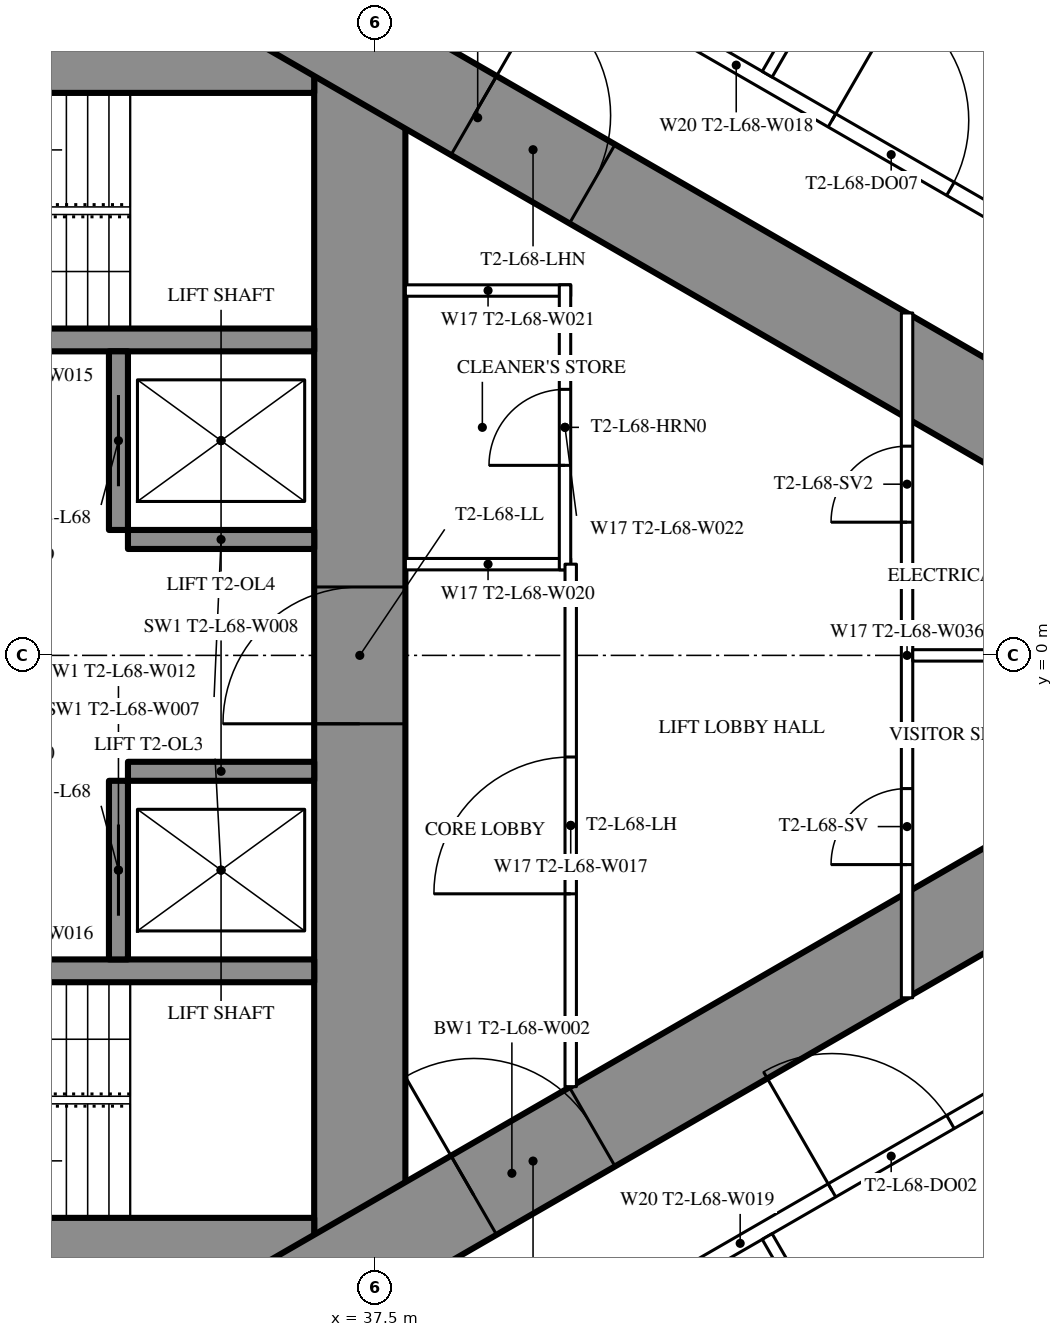
"""IFC4 building model, lengths in metres.
Left out: names, types, materials, properties, quantities, classifications, styles, units other than length and angle.
Written with IfcOpenShell. Run it as: python <this file> out.ifc"""

import sys

from ifc_helpers import new_model, si_unit, direction, frame, frame_2d, origin, place, context, subcontext, project, spatial, rectangle, extrude, element, fill, save


model = new_model("IFC4")
c1 = context("Model", 3, precision=1e-05, world=origin(), true_north=direction((0.0, 1.0)))
c2 = subcontext(c1, "Body", "Model", "MODEL_VIEW")
j1 = project(units=[si_unit("LENGTHUNIT", "METRE"), si_unit("PLANEANGLEUNIT", "RADIAN")], contexts=[c1])
p1 = place(None, origin())
s1 = spatial("IfcSite", under=j1, at=p1, CompositionType="ELEMENT")
p2 = place(p1, origin())
s2 = spatial("IfcBuilding", under=s1, at=p2, CompositionType="ELEMENT")
p3 = place(p2, frame((0.0, 0.0, 257.3)))
s3 = spatial("IfcBuildingStorey", under=s2, at=p3, CompositionType="ELEMENT", Elevation=257.3)
p4 = place(p3, frame((37.3, -8.6, 0.0), z_axis=(0.0, 0.0, 1.0), x_axis=(0.0, 1.0, 0.0)))
e1 = element("IfcWall", 1, at=p4, inside=s3, PredefinedType="SHEAR", context=c2, shape_type="SweptSolid", body=[
    extrude(rectangle(XDim=17.2, YDim=1.2, at=frame_2d((8.6, 0.0))), origin(), (0.0, 0.0, 1.0), 6.0),
])
p5 = place(p4, frame((7.7, 0.0, 0.0)))
e2 = element("IfcOpeningElement", 2, at=p5, cuts=e1, PredefinedType="OPENING", context=c2, shape_type="SweptSolid", body=[
    extrude(rectangle(XDim=1.8, YDim=2.2, at=frame_2d((0.9, 1.1))), frame((0.0, 0.61, 0.0), z_axis=(0.0, -1.0, 0.0), x_axis=(1.0, 0.0, 0.0)), (0.0, 0.0, 1.0), 1.22),
])
p6 = place(p3, frame((28.3, -8.0, 0.0), z_axis=(0.0, 0.0, 1.0), x_axis=(1.0, 0.0, 0.0)))
e3 = element("IfcWall", 3, at=p6, inside=s3, PredefinedType="SHEAR", context=c2, shape_type="SweptSolid", body=[
    extrude(rectangle(XDim=8.4, YDim=1.2, at=frame_2d((4.2, 0.0))), origin(), (0.0, 0.0, 1.0), 6.0),
])
p7 = place(p6, frame((0.25, 0.0, 0.0)))
e4 = element("IfcOpeningElement", 4, at=p7, cuts=e3, PredefinedType="OPENING", context=c2, shape_type="SweptSolid", body=[
    extrude(rectangle(XDim=1.0, YDim=2.2, at=frame_2d((0.5, 1.1))), frame((0.0, 0.61, 0.0), z_axis=(0.0, -1.0, 0.0), x_axis=(1.0, 0.0, 0.0)), (0.0, 0.0, 1.0), 1.22),
])
p8 = place(p3, frame((28.3, 8.0, 0.0), z_axis=(0.0, 0.0, 1.0), x_axis=(1.0, 0.0, 0.0)))
e5 = element("IfcWall", 5, at=p8, inside=s3, PredefinedType="SHEAR", context=c2, shape_type="SweptSolid", body=[
    extrude(rectangle(XDim=8.4, YDim=1.2, at=frame_2d((4.2, 0.0))), origin(), (0.0, 0.0, 1.0), 6.0),
])
p9 = place(p8, frame((0.25, 0.0, 0.0)))
e6 = element("IfcOpeningElement", 6, at=p9, cuts=e5, PredefinedType="OPENING", context=c2, shape_type="SweptSolid", body=[
    extrude(rectangle(XDim=1.0, YDim=2.2, at=frame_2d((0.5, 1.1))), frame((0.0, 0.61, 0.0), z_axis=(0.0, -1.0, 0.0), x_axis=(1.0, 0.0, 0.0)), (0.0, 0.0, 1.0), 1.22),
])
for number, where, z_axis, x_axis in (
    (7, (28.3, -4.15, 0.0), (0.0, 0.0, 1.0), (1.0, 0.0, 0.0)),
    (8, (28.3, 4.15, 0.0), (0.0, 0.0, 1.0), (1.0, 0.0, 0.0)),
):
    element("IfcWall", number, at=place(p3, frame(where, z_axis=z_axis, x_axis=x_axis)), inside=s3, PredefinedType="SHEAR", context=c2, shape_type="SweptSolid", body=[
        extrude(rectangle(XDim=8.4, YDim=0.3, at=frame_2d((4.2, 0.0))), origin(), (0.0, 0.0, 1.0), 6.0),
    ])
p10 = place(p3, frame((34.125, -4.0, 0.0), z_axis=(0.0, 0.0, 1.0), x_axis=(0.0, 1.0, 0.0)))
e9 = element("IfcWall", 9, at=p10, inside=s3, PredefinedType="SHEAR", context=c2, shape_type="SweptSolid", body=[
    extrude(rectangle(XDim=2.35, YDim=0.25, at=frame_2d((1.175, 0.0))), origin(), (0.0, 0.0, 1.0), 6.0),
])
p11 = place(p10, frame((0.575, 0.0, 0.0)))
e10 = element("IfcOpeningElement", 10, at=p11, cuts=e9, PredefinedType="OPENING", context=c2, shape_type="SweptSolid", body=[
    extrude(rectangle(XDim=1.2, YDim=2.2, at=frame_2d((0.6, 1.1))), frame((0.0, 0.135, 0.0), z_axis=(0.0, -1.0, 0.0), x_axis=(1.0, 0.0, 0.0)), (0.0, 0.0, 1.0), 0.27),
])
p12 = place(p3, frame((34.25, -1.525, 0.0), z_axis=(0.0, 0.0, 1.0), x_axis=(1.0, 0.0, 0.0)))
e11 = element("IfcWall", 11, at=p12, inside=s3, PredefinedType="SHEAR", context=c2, shape_type="SweptSolid", body=[
    extrude(rectangle(XDim=2.45, YDim=0.25, at=frame_2d((1.225, 0.0))), origin(), (0.0, 0.0, 1.0), 6.0),
])
p13 = place(p3, frame((34.125, 1.65, 0.0), z_axis=(0.0, 0.0, 1.0), x_axis=(0.0, 1.0, 0.0)))
e12 = element("IfcWall", 12, at=p13, inside=s3, PredefinedType="SHEAR", context=c2, shape_type="SweptSolid", body=[
    extrude(rectangle(XDim=2.35, YDim=0.25, at=frame_2d((1.175, 0.0))), origin(), (0.0, 0.0, 1.0), 6.0),
])
p14 = place(p13, frame((0.575, 0.0, 0.0)))
e13 = element("IfcOpeningElement", 13, at=p14, cuts=e12, PredefinedType="OPENING", context=c2, shape_type="SweptSolid", body=[
    extrude(rectangle(XDim=1.2, YDim=2.2, at=frame_2d((0.6, 1.1))), frame((0.0, 0.135, 0.0), z_axis=(0.0, -1.0, 0.0), x_axis=(1.0, 0.0, 0.0)), (0.0, 0.0, 1.0), 0.27),
])
p15 = place(p3, frame((34.25, 1.525, 0.0), z_axis=(0.0, 0.0, 1.0), x_axis=(1.0, 0.0, 0.0)))
e14 = element("IfcWall", 14, at=p15, inside=s3, PredefinedType="SHEAR", context=c2, shape_type="SweptSolid", body=[
    extrude(rectangle(XDim=2.45, YDim=0.25, at=frame_2d((1.225, 0.0))), origin(), (0.0, 0.0, 1.0), 6.0),
])
p16 = place(p3, frame((27.2, -13.8, 0.0), z_axis=(0.0, 0.0, 1.0), x_axis=(0.866027159892, 0.499996958321, 0.0)))
e15 = element("IfcWall", 15, at=p16, inside=s3, PredefinedType="SHEAR", context=c2, shape_type="SweptSolid", body=[
    extrude(rectangle(XDim=27.947, YDim=1.2, at=frame_2d((13.973, 0.0))), origin(), (0.0, 0.0, 1.0), 6.0),
])
p17 = place(p16, frame((4.6, 0.0, 0.0)))
e16 = element("IfcOpeningElement", 16, at=p17, cuts=e15, PredefinedType="OPENING", context=c2, shape_type="SweptSolid", body=[
    extrude(rectangle(XDim=1.0, YDim=2.2, at=frame_2d((0.5, 1.1))), frame((0.0, 0.61, 0.0), z_axis=(0.0, -1.0, 0.0), x_axis=(1.0, 0.0, 0.0)), (0.0, 0.0, 1.0), 1.22),
])
p18 = place(p16, frame((13.395, 0.0, 0.0)))
e17 = element("IfcOpeningElement", 17, at=p18, cuts=e15, PredefinedType="OPENING", context=c2, shape_type="SweptSolid", body=[
    extrude(rectangle(XDim=1.8, YDim=2.2, at=frame_2d((0.9, 1.1))), frame((0.0, 0.61, 0.0), z_axis=(0.0, -1.0, 0.0), x_axis=(1.0, 0.0, 0.0)), (0.0, 0.0, 1.0), 1.22),
])
p19 = place(p3, frame((27.2, 13.8, 0.0), z_axis=(0.0, 0.0, 1.0), x_axis=(0.866024515034, -0.500001539357, 0.0)))
e18 = element("IfcWall", 18, at=p19, inside=s3, PredefinedType="SHEAR", context=c2, shape_type="SweptSolid", body=[
    extrude(rectangle(XDim=26.907, YDim=1.2, at=frame_2d((13.454, 0.0))), origin(), (0.0, 0.0, 1.0), 6.0),
])
p20 = place(p19, frame((4.6, 0.0, 0.0)))
e19 = element("IfcOpeningElement", 19, at=p20, cuts=e18, PredefinedType="OPENING", context=c2, shape_type="SweptSolid", body=[
    extrude(rectangle(XDim=1.0, YDim=2.2, at=frame_2d((0.5, 1.1))), frame((0.0, 0.61, 0.0), z_axis=(0.0, -1.0, 0.0), x_axis=(1.0, 0.0, 0.0)), (0.0, 0.0, 1.0), 1.22),
])
p21 = place(p19, frame((13.395, 0.0, 0.0)))
e20 = element("IfcOpeningElement", 20, at=p21, cuts=e18, PredefinedType="OPENING", context=c2, shape_type="SweptSolid", body=[
    extrude(rectangle(XDim=1.8, YDim=2.2, at=frame_2d((0.9, 1.1))), frame((0.0, 0.61, 0.0), z_axis=(0.0, -1.0, 0.0), x_axis=(1.0, 0.0, 0.0)), (0.0, 0.0, 1.0), 1.22),
])
p22 = place(p3, frame((28.907, -15.47, 0.0), z_axis=(0.0, 0.0, 1.0), x_axis=(0.866023700353, 0.500002950419, 0.0)))
e21 = element("IfcWall", 21, at=p22, inside=s3, PredefinedType="PARTITIONING", context=c2, shape_type="SweptSolid", body=[
    extrude(rectangle(XDim=30.941, YDim=0.2, at=frame_2d((15.47, 0.0))), origin(), (0.0, 0.0, 1.0), 5.75),
])
p23 = place(p22, frame((7.024, 0.0, 0.0)))
e22 = element("IfcOpeningElement", 22, at=p23, cuts=e21, PredefinedType="OPENING", context=c2, shape_type="SweptSolid", body=[
    extrude(rectangle(XDim=2.0, YDim=2.4, at=frame_2d((1.0, 1.2))), frame((0.0, 0.11, 0.0), z_axis=(0.0, -1.0, 0.0), x_axis=(1.0, 0.0, 0.0)), (0.0, 0.0, 1.0), 0.22),
])
p24 = place(p22, frame((16.865, 0.0, 0.0)))
e23 = element("IfcOpeningElement", 23, at=p24, cuts=e21, PredefinedType="OPENING", context=c2, shape_type="SweptSolid", body=[
    extrude(rectangle(XDim=1.8, YDim=2.2, at=frame_2d((0.9, 1.1))), frame((0.0, 0.11, 0.0), z_axis=(0.0, -1.0, 0.0), x_axis=(1.0, 0.0, 0.0)), (0.0, 0.0, 1.0), 0.22),
])
p25 = place(p22, frame((20.748, 0.0, 0.0)))
e24 = element("IfcOpeningElement", 24, at=p25, cuts=e21, PredefinedType="OPENING", context=c2, shape_type="SweptSolid", body=[
    extrude(rectangle(XDim=1.8, YDim=2.2, at=frame_2d((0.9, 1.1))), frame((0.0, 0.11, 0.0), z_axis=(0.0, -1.0, 0.0), x_axis=(1.0, 0.0, 0.0)), (0.0, 0.0, 1.0), 0.22),
])
p26 = place(p22, frame((26.152, 0.0, 0.0)))
e25 = element("IfcOpeningElement", 25, at=p26, cuts=e21, PredefinedType="OPENING", context=c2, shape_type="SweptSolid", body=[
    extrude(rectangle(XDim=2.0, YDim=2.4, at=frame_2d((1.0, 1.2))), frame((0.0, 0.11, 0.0), z_axis=(0.0, -1.0, 0.0), x_axis=(1.0, 0.0, 0.0)), (0.0, 0.0, 1.0), 0.22),
])
p27 = place(p3, frame((28.907, 15.47, 0.0), z_axis=(0.0, 0.0, 1.0), x_axis=(0.866025841386, -0.499999242051, 0.0)))
e26 = element("IfcWall", 26, at=p27, inside=s3, PredefinedType="PARTITIONING", context=c2, shape_type="SweptSolid", body=[
    extrude(rectangle(XDim=30.821, YDim=0.2, at=frame_2d((15.41, 0.0))), origin(), (0.0, 0.0, 1.0), 5.75),
])
p28 = place(p27, frame((26.092, 0.0, 0.0)))
e27 = element("IfcOpeningElement", 27, at=p28, cuts=e26, PredefinedType="OPENING", context=c2, shape_type="SweptSolid", body=[
    extrude(rectangle(XDim=2.0, YDim=2.4, at=frame_2d((1.0, 1.2))), frame((0.0, 0.11, 0.0), z_axis=(0.0, -1.0, 0.0), x_axis=(1.0, 0.0, 0.0)), (0.0, 0.0, 1.0), 0.22),
])
p29 = place(p27, frame((20.748, 0.0, 0.0)))
e28 = element("IfcOpeningElement", 28, at=p29, cuts=e26, PredefinedType="OPENING", context=c2, shape_type="SweptSolid", body=[
    extrude(rectangle(XDim=1.8, YDim=2.2, at=frame_2d((0.9, 1.1))), frame((0.0, 0.11, 0.0), z_axis=(0.0, -1.0, 0.0), x_axis=(1.0, 0.0, 0.0)), (0.0, 0.0, 1.0), 0.22),
])
p30 = place(p27, frame((16.865, 0.0, 0.0)))
e29 = element("IfcOpeningElement", 29, at=p30, cuts=e26, PredefinedType="OPENING", context=c2, shape_type="SweptSolid", body=[
    extrude(rectangle(XDim=1.8, YDim=2.2, at=frame_2d((0.9, 1.1))), frame((0.0, 0.11, 0.0), z_axis=(0.0, -1.0, 0.0), x_axis=(1.0, 0.0, 0.0)), (0.0, 0.0, 1.0), 0.22),
])
p31 = place(p27, frame((7.024, 0.0, 0.0)))
e30 = element("IfcOpeningElement", 30, at=p31, cuts=e26, PredefinedType="OPENING", context=c2, shape_type="SweptSolid", body=[
    extrude(rectangle(XDim=2.0, YDim=2.4, at=frame_2d((1.0, 1.2))), frame((0.0, 0.11, 0.0), z_axis=(0.0, -1.0, 0.0), x_axis=(1.0, 0.0, 0.0)), (0.0, 0.0, 1.0), 0.22),
])
for number, where, z_axis, x_axis in (
    (31, (42.66, -7.646, 0.0), (0.0, 0.0, 1.0), (0.5, -0.866, 0.0)),
    (32, (42.66, 7.646, 0.0), (0.0, 0.0, 1.0), (0.5, 0.866, 0.0)),
):
    element("IfcWall", number, at=place(p3, frame(where, z_axis=z_axis, x_axis=x_axis)), inside=s3, PredefinedType="PARTITIONING", context=c2, shape_type="SweptSolid", body=[
        extrude(rectangle(XDim=6.398, YDim=0.15, at=frame_2d((3.199, 0.0))), origin(), (0.0, 0.0, 1.0), 4.85),
    ])
for number, where, z_axis, x_axis in (
    (33, (37.9, 1.2, 0.0), (0.0, 0.0, 1.0), (1.0, 0.0, 0.0)),
    (34, (37.9, 4.8, 0.0), (0.0, 0.0, 1.0), (1.0, 0.0, 0.0)),
):
    element("IfcWall", number, at=place(p3, frame(where, z_axis=z_axis, x_axis=x_axis)), inside=s3, PredefinedType="PARTITIONING", context=c2, shape_type="SweptSolid", body=[
        extrude(rectangle(XDim=2.175, YDim=0.15, at=frame_2d((1.087, 0.0))), origin(), (0.0, 0.0, 1.0), 5.75),
    ])
p32 = place(p3, frame((40.0, 1.125, 0.0), z_axis=(0.0, 0.0, 1.0), x_axis=(0.0, 1.0, 0.0)))
e35 = element("IfcWall", 35, at=p32, inside=s3, PredefinedType="PARTITIONING", context=c2, shape_type="SweptSolid", body=[
    extrude(rectangle(XDim=3.75, YDim=0.15, at=frame_2d((1.875, 0.0))), origin(), (0.0, 0.0, 1.0), 5.75),
])
p33 = place(p32, frame((1.375, 0.0, 0.0)))
e36 = element("IfcOpeningElement", 36, at=p33, cuts=e35, PredefinedType="OPENING", context=c2, shape_type="SweptSolid", body=[
    extrude(rectangle(XDim=1.0, YDim=2.2, at=frame_2d((0.5, 1.1))), frame((0.0, 0.085, 0.0), z_axis=(0.0, -1.0, 0.0), x_axis=(1.0, 0.0, 0.0)), (0.0, 0.0, 1.0), 0.17),
])
p34 = place(p3, frame((40.075, -5.674, 0.0), z_axis=(0.0, 0.0, 1.0), x_axis=(0.0, 1.0, 0.0)))
e37 = element("IfcWall", 37, at=p34, inside=s3, PredefinedType="PARTITIONING", context=c2, shape_type="SweptSolid", body=[
    extrude(rectangle(XDim=6.874, YDim=0.15, at=frame_2d((3.437, 0.0))), origin(), (0.0, 0.0, 1.0), 5.75),
])
p35 = place(p34, frame((2.537, 0.0, 0.0)))
e38 = element("IfcOpeningElement", 38, at=p35, cuts=e37, PredefinedType="OPENING", context=c2, shape_type="SweptSolid", body=[
    extrude(rectangle(XDim=1.8, YDim=2.2, at=frame_2d((0.9, 1.1))), frame((0.0, 0.085, 0.0), z_axis=(0.0, -1.0, 0.0), x_axis=(1.0, 0.0, 0.0)), (0.0, 0.0, 1.0), 0.17),
])
p36 = place(p3, frame((44.5, -4.505, 0.0), z_axis=(0.0, 0.0, 1.0), x_axis=(0.0, 1.0, 0.0)))
e39 = element("IfcWall", 39, at=p36, inside=s3, PredefinedType="PARTITIONING", context=c2, shape_type="SweptSolid", body=[
    extrude(rectangle(XDim=9.009, YDim=0.15, at=frame_2d((4.505, 0.0))), origin(), (0.0, 0.0, 1.0), 5.75),
])
p37 = place(p36, frame((1.752, 0.0, 0.0)))
e40 = element("IfcOpeningElement", 40, at=p37, cuts=e39, PredefinedType="OPENING", context=c2, shape_type="SweptSolid", body=[
    extrude(rectangle(XDim=1.0, YDim=2.2, at=frame_2d((0.5, 1.1))), frame((0.0, 0.085, 0.0), z_axis=(0.0, -1.0, 0.0), x_axis=(1.0, 0.0, 0.0)), (0.0, 0.0, 1.0), 0.17),
])
p38 = place(p36, frame((6.257, 0.0, 0.0)))
e41 = element("IfcOpeningElement", 41, at=p38, cuts=e39, PredefinedType="OPENING", context=c2, shape_type="SweptSolid", body=[
    extrude(rectangle(XDim=1.0, YDim=2.2, at=frame_2d((0.5, 1.1))), frame((0.0, 0.085, 0.0), z_axis=(0.0, -1.0, 0.0), x_axis=(1.0, 0.0, 0.0)), (0.0, 0.0, 1.0), 0.17),
])
p39 = place(p3, frame((44.575, 0.0, 0.0), z_axis=(0.0, 0.0, 1.0), x_axis=(1.0, 0.0, 0.0)))
e42 = element("IfcWall", 42, at=p39, inside=s3, PredefinedType="PARTITIONING", context=c2, shape_type="SweptSolid", body=[
    extrude(rectangle(XDim=7.727, YDim=0.15, at=frame_2d((3.864, 0.0))), origin(), (0.0, 0.0, 1.0), 4.85),
])
p40 = place(p24, origin())
e43 = element("IfcDoor", 43, at=p40, inside=s3, OperationType="DOUBLE_DOOR_SINGLE_SWING", PredefinedType="DOOR", context=c2, shape_type="SweptSolid", body=[
    extrude(rectangle(XDim=1.8, YDim=2.2, at=frame_2d((0.9, 1.1))), frame((0.0, 0.025, 0.0), z_axis=(0.0, -1.0, 0.0), x_axis=(1.0, 0.0, 0.0)), (0.0, 0.0, 1.0), 0.05),
])
fill(e23, e43)
p41 = place(p30, origin())
e44 = element("IfcDoor", 44, at=p41, inside=s3, OperationType="DOUBLE_DOOR_SINGLE_SWING", PredefinedType="DOOR", context=c2, shape_type="SweptSolid", body=[
    extrude(rectangle(XDim=1.8, YDim=2.2, at=frame_2d((0.9, 1.1))), frame((0.0, 0.025, 0.0), z_axis=(0.0, -1.0, 0.0), x_axis=(1.0, 0.0, 0.0)), (0.0, 0.0, 1.0), 0.05),
])
fill(e29, e44)
p42 = place(p33, origin())
e45 = element("IfcDoor", 45, at=p42, inside=s3, OperationType="SINGLE_SWING_LEFT", PredefinedType="DOOR", context=c2, shape_type="SweptSolid", body=[
    extrude(rectangle(XDim=1.0, YDim=2.2, at=frame_2d((0.5, 1.1))), frame((0.0, 0.025, 0.0), z_axis=(0.0, -1.0, 0.0), x_axis=(1.0, 0.0, 0.0)), (0.0, 0.0, 1.0), 0.05),
])
fill(e36, e45)
p43 = place(p35, origin())
e46 = element("IfcDoor", 46, at=p43, inside=s3, OperationType="DOUBLE_DOOR_SINGLE_SWING", PredefinedType="DOOR", context=c2, shape_type="SweptSolid", body=[
    extrude(rectangle(XDim=1.8, YDim=2.2, at=frame_2d((0.9, 1.1))), frame((0.0, 0.025, 0.0), z_axis=(0.0, -1.0, 0.0), x_axis=(1.0, 0.0, 0.0)), (0.0, 0.0, 1.0), 0.05),
])
fill(e38, e46)
p44 = place(p37, origin())
e47 = element("IfcDoor", 47, at=p44, inside=s3, OperationType="SINGLE_SWING_LEFT", PredefinedType="DOOR", context=c2, shape_type="SweptSolid", body=[
    extrude(rectangle(XDim=1.0, YDim=2.2, at=frame_2d((0.5, 1.1))), frame((0.0, 0.025, 0.0), z_axis=(0.0, -1.0, 0.0), x_axis=(1.0, 0.0, 0.0)), (0.0, 0.0, 1.0), 0.05),
])
fill(e40, e47)
p45 = place(p38, origin())
e48 = element("IfcDoor", 48, at=p45, inside=s3, OperationType="SINGLE_SWING_LEFT", PredefinedType="DOOR", context=c2, shape_type="SweptSolid", body=[
    extrude(rectangle(XDim=1.0, YDim=2.2, at=frame_2d((0.5, 1.1))), frame((0.0, 0.025, 0.0), z_axis=(0.0, -1.0, 0.0), x_axis=(1.0, 0.0, 0.0)), (0.0, 0.0, 1.0), 0.05),
])
fill(e41, e48)
p46 = place(p18, origin())
e49 = element("IfcDoor", 49, at=p46, inside=s3, OperationType="DOUBLE_DOOR_SINGLE_SWING", PredefinedType="DOOR", context=c2, shape_type="SweptSolid", body=[
    extrude(rectangle(XDim=1.8, YDim=2.2, at=frame_2d((0.9, 1.1))), frame((0.0, 0.025, 0.0), z_axis=(0.0, -1.0, 0.0), x_axis=(1.0, 0.0, 0.0)), (0.0, 0.0, 1.0), 0.05),
])
fill(e17, e49)
p47 = place(p21, origin())
e50 = element("IfcDoor", 50, at=p47, inside=s3, OperationType="DOUBLE_DOOR_SINGLE_SWING", PredefinedType="DOOR", context=c2, shape_type="SweptSolid", body=[
    extrude(rectangle(XDim=1.8, YDim=2.2, at=frame_2d((0.9, 1.1))), frame((0.0, 0.025, 0.0), z_axis=(0.0, -1.0, 0.0), x_axis=(1.0, 0.0, 0.0)), (0.0, 0.0, 1.0), 0.05),
])
fill(e20, e50)
p48 = place(p5, origin())
e51 = element("IfcDoor", 51, at=p48, inside=s3, OperationType="DOUBLE_DOOR_SINGLE_SWING", PredefinedType="DOOR", context=c2, shape_type="SweptSolid", body=[
    extrude(rectangle(XDim=1.8, YDim=2.2, at=frame_2d((0.9, 1.1))), frame((0.0, 0.025, 0.0), z_axis=(0.0, -1.0, 0.0), x_axis=(1.0, 0.0, 0.0)), (0.0, 0.0, 1.0), 0.05),
])
fill(e2, e51)
p49 = place(p11, origin())
e52 = element("IfcDoor", 52, at=p49, inside=s3, OperationType="DOUBLE_DOOR_SLIDING", PredefinedType="USERDEFINED", context=c2, shape_type="SweptSolid", body=[
    extrude(rectangle(XDim=1.2, YDim=2.2, at=frame_2d((0.6, 1.1))), frame((0.0, 0.025, 0.0), z_axis=(0.0, -1.0, 0.0), x_axis=(1.0, 0.0, 0.0)), (0.0, 0.0, 1.0), 0.05),
])
fill(e10, e52)
p50 = place(p14, origin())
e53 = element("IfcDoor", 53, at=p50, inside=s3, OperationType="DOUBLE_DOOR_SLIDING", PredefinedType="USERDEFINED", context=c2, shape_type="SweptSolid", body=[
    extrude(rectangle(XDim=1.2, YDim=2.2, at=frame_2d((0.6, 1.1))), frame((0.0, 0.025, 0.0), z_axis=(0.0, -1.0, 0.0), x_axis=(1.0, 0.0, 0.0)), (0.0, 0.0, 1.0), 0.05),
])
fill(e13, e53)
save(model, sys.argv[1])
